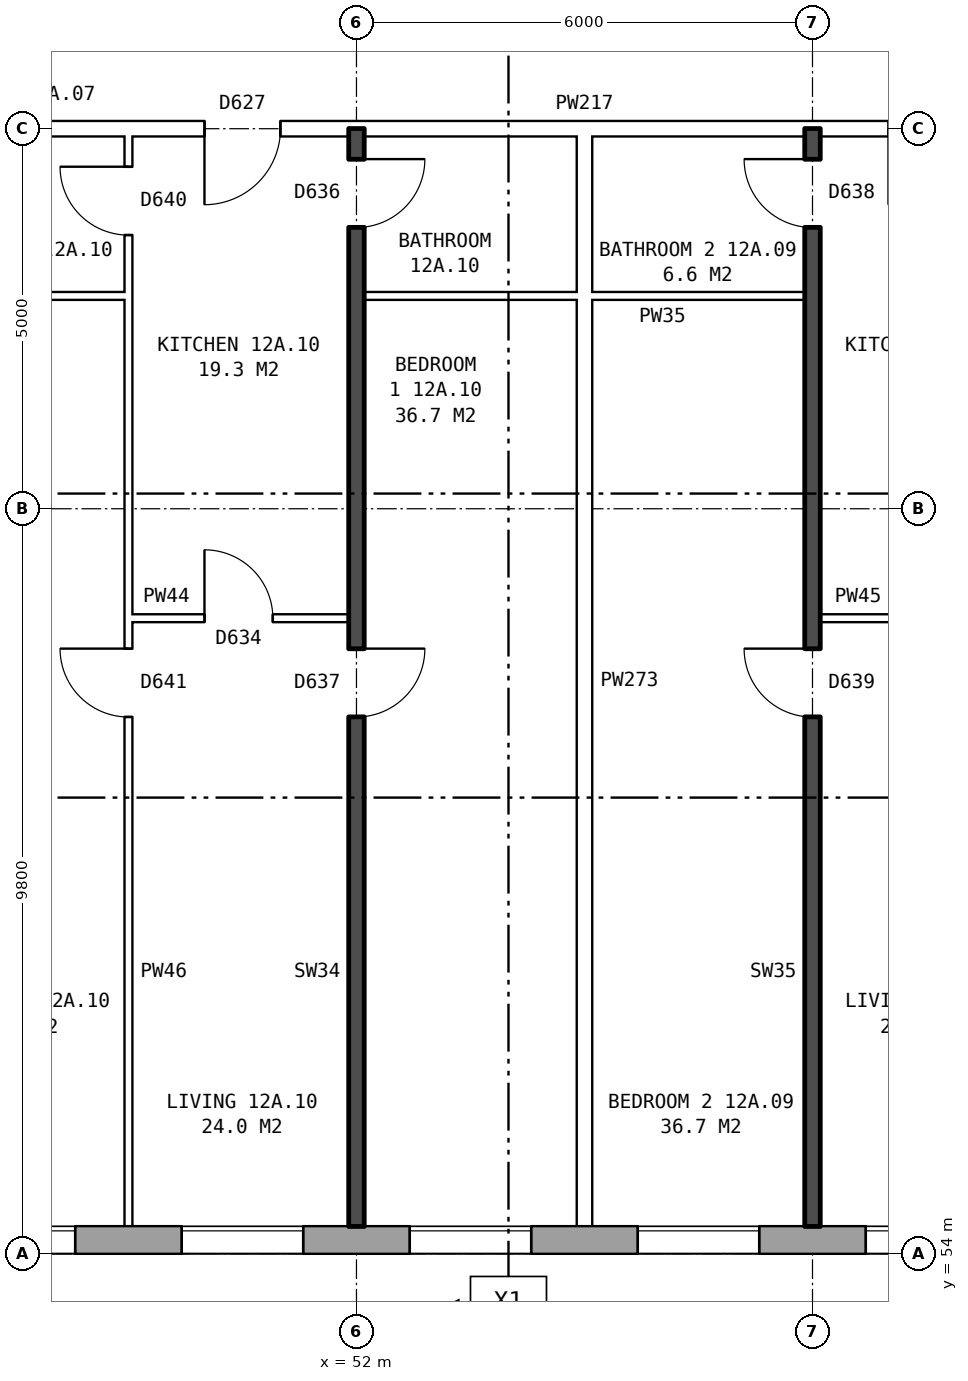
"""IFC4 building model, lengths in metres.
Left out: names, types, materials, properties, quantities, classifications, styles, units other than length and angle.
Written with IfcOpenShell. Run it as: python <this file> out.ifc"""

import sys

from ifc_helpers import new_model, si_unit, direction, frame, frame_2d, origin, place, context, subcontext, project, spatial, rectangle, extrude, element, fill, save


model = new_model("IFC4")
c1 = context("Model", 3, precision=1e-05, world=origin(), true_north=direction((0.0, 1.0)))
c2 = subcontext(c1, "Body", "Model", "MODEL_VIEW")
j1 = project(units=[si_unit("LENGTHUNIT", "METRE"), si_unit("PLANEANGLEUNIT", "RADIAN")], contexts=[c1])
p1 = place(None, origin())
s1 = spatial("IfcSite", under=j1, at=p1, CompositionType="ELEMENT")
p2 = place(p1, origin())
s2 = spatial("IfcBuilding", under=s1, at=p2, CompositionType="ELEMENT")
p3 = place(p2, frame((0.0, 0.0, 47.4)))
s3 = spatial("IfcBuildingStorey", under=s2, at=p3, CompositionType="ELEMENT", Elevation=47.4)
p4 = place(p3, frame((24.575, 54.18, 0.0), z_axis=(0.0, 0.0, 1.0), x_axis=(1.0, 0.0, 0.0)))
e1 = element("IfcWall", 1, at=p4, inside=s3, PredefinedType="STANDARD", context=c2, shape_type="SweptSolid", body=[
    extrude(rectangle(XDim=48.351, YDim=0.36, at=frame_2d((24.175, 0.0))), origin(), (0.0, 0.0, 1.0), 2.85),
])
p5 = place(p4, frame((1.125, 0.0, 0.8)))
e2 = element("IfcOpeningElement", 2, at=p5, cuts=e1, PredefinedType="OPENING", context=c2, shape_type="SweptSolid", body=[
    extrude(rectangle(XDim=1.6, YDim=1.8, at=frame_2d((0.8, 0.9))), frame((0.0, 0.19, 0.0), z_axis=(0.0, -1.0, 0.0), x_axis=(1.0, 0.0, 0.0)), (0.0, 0.0, 1.0), 0.38),
])
p6 = place(p4, frame((5.625, 0.0, 0.8)))
e3 = element("IfcOpeningElement", 3, at=p6, cuts=e1, PredefinedType="OPENING", context=c2, shape_type="SweptSolid", body=[
    extrude(rectangle(XDim=1.2, YDim=1.2, at=frame_2d((0.6, 0.6))), frame((0.0, 0.19, 0.0), z_axis=(0.0, -1.0, 0.0), x_axis=(1.0, 0.0, 0.0)), (0.0, 0.0, 1.0), 0.38),
])
p7 = place(p4, frame((7.125, 0.0, 0.8)))
e4 = element("IfcOpeningElement", 4, at=p7, cuts=e1, PredefinedType="OPENING", context=c2, shape_type="SweptSolid", body=[
    extrude(rectangle(XDim=1.6, YDim=1.8, at=frame_2d((0.8, 0.9))), frame((0.0, 0.19, 0.0), z_axis=(0.0, -1.0, 0.0), x_axis=(1.0, 0.0, 0.0)), (0.0, 0.0, 1.0), 0.38),
])
p8 = place(p4, frame((10.125, 0.0, 0.8)))
e5 = element("IfcOpeningElement", 5, at=p8, cuts=e1, PredefinedType="OPENING", context=c2, shape_type="SweptSolid", body=[
    extrude(rectangle(XDim=1.6, YDim=1.8, at=frame_2d((0.8, 0.9))), frame((0.0, 0.19, 0.0), z_axis=(0.0, -1.0, 0.0), x_axis=(1.0, 0.0, 0.0)), (0.0, 0.0, 1.0), 0.38),
])
p9 = place(p4, frame((13.125, 0.0, 0.8)))
e6 = element("IfcOpeningElement", 6, at=p9, cuts=e1, PredefinedType="OPENING", context=c2, shape_type="SweptSolid", body=[
    extrude(rectangle(XDim=1.6, YDim=1.8, at=frame_2d((0.8, 0.9))), frame((0.0, 0.19, 0.0), z_axis=(0.0, -1.0, 0.0), x_axis=(1.0, 0.0, 0.0)), (0.0, 0.0, 1.0), 0.38),
])
p10 = place(p4, frame((16.125, 0.0, 0.8)))
e7 = element("IfcOpeningElement", 7, at=p10, cuts=e1, PredefinedType="OPENING", context=c2, shape_type="SweptSolid", body=[
    extrude(rectangle(XDim=1.6, YDim=1.8, at=frame_2d((0.8, 0.9))), frame((0.0, 0.19, 0.0), z_axis=(0.0, -1.0, 0.0), x_axis=(1.0, 0.0, 0.0)), (0.0, 0.0, 1.0), 0.38),
])
p11 = place(p4, frame((19.125, 0.0, 0.8)))
e8 = element("IfcOpeningElement", 8, at=p11, cuts=e1, PredefinedType="OPENING", context=c2, shape_type="SweptSolid", body=[
    extrude(rectangle(XDim=1.6, YDim=1.8, at=frame_2d((0.8, 0.9))), frame((0.0, 0.19, 0.0), z_axis=(0.0, -1.0, 0.0), x_axis=(1.0, 0.0, 0.0)), (0.0, 0.0, 1.0), 0.38),
])
p12 = place(p4, frame((22.125, 0.0, 0.8)))
e9 = element("IfcOpeningElement", 9, at=p12, cuts=e1, PredefinedType="OPENING", context=c2, shape_type="SweptSolid", body=[
    extrude(rectangle(XDim=1.6, YDim=1.8, at=frame_2d((0.8, 0.9))), frame((0.0, 0.19, 0.0), z_axis=(0.0, -1.0, 0.0), x_axis=(1.0, 0.0, 0.0)), (0.0, 0.0, 1.0), 0.38),
])
p13 = place(p4, frame((25.125, 0.0, 0.8)))
e10 = element("IfcOpeningElement", 10, at=p13, cuts=e1, PredefinedType="OPENING", context=c2, shape_type="SweptSolid", body=[
    extrude(rectangle(XDim=1.6, YDim=1.8, at=frame_2d((0.8, 0.9))), frame((0.0, 0.19, 0.0), z_axis=(0.0, -1.0, 0.0), x_axis=(1.0, 0.0, 0.0)), (0.0, 0.0, 1.0), 0.38),
])
p14 = place(p4, frame((28.125, 0.0, 0.8)))
e11 = element("IfcOpeningElement", 11, at=p14, cuts=e1, PredefinedType="OPENING", context=c2, shape_type="SweptSolid", body=[
    extrude(rectangle(XDim=1.6, YDim=1.8, at=frame_2d((0.8, 0.9))), frame((0.0, 0.19, 0.0), z_axis=(0.0, -1.0, 0.0), x_axis=(1.0, 0.0, 0.0)), (0.0, 0.0, 1.0), 0.38),
])
p15 = place(p4, frame((31.125, 0.0, 0.8)))
e12 = element("IfcOpeningElement", 12, at=p15, cuts=e1, PredefinedType="OPENING", context=c2, shape_type="SweptSolid", body=[
    extrude(rectangle(XDim=1.6, YDim=1.8, at=frame_2d((0.8, 0.9))), frame((0.0, 0.19, 0.0), z_axis=(0.0, -1.0, 0.0), x_axis=(1.0, 0.0, 0.0)), (0.0, 0.0, 1.0), 0.38),
])
p16 = place(p4, frame((34.125, 0.0, 0.8)))
e13 = element("IfcOpeningElement", 13, at=p16, cuts=e1, PredefinedType="OPENING", context=c2, shape_type="SweptSolid", body=[
    extrude(rectangle(XDim=1.6, YDim=1.8, at=frame_2d((0.8, 0.9))), frame((0.0, 0.19, 0.0), z_axis=(0.0, -1.0, 0.0), x_axis=(1.0, 0.0, 0.0)), (0.0, 0.0, 1.0), 0.38),
])
p17 = place(p4, frame((37.125, 0.0, 0.8)))
e14 = element("IfcOpeningElement", 14, at=p17, cuts=e1, PredefinedType="OPENING", context=c2, shape_type="SweptSolid", body=[
    extrude(rectangle(XDim=1.6, YDim=1.8, at=frame_2d((0.8, 0.9))), frame((0.0, 0.19, 0.0), z_axis=(0.0, -1.0, 0.0), x_axis=(1.0, 0.0, 0.0)), (0.0, 0.0, 1.0), 0.38),
])
p18 = place(p4, frame((40.125, 0.0, 0.8)))
e15 = element("IfcOpeningElement", 15, at=p18, cuts=e1, PredefinedType="OPENING", context=c2, shape_type="SweptSolid", body=[
    extrude(rectangle(XDim=1.6, YDim=1.8, at=frame_2d((0.8, 0.9))), frame((0.0, 0.19, 0.0), z_axis=(0.0, -1.0, 0.0), x_axis=(1.0, 0.0, 0.0)), (0.0, 0.0, 1.0), 0.38),
])
p19 = place(p4, frame((42.025, 0.0, 0.8)))
e16 = element("IfcOpeningElement", 16, at=p19, cuts=e1, PredefinedType="OPENING", context=c2, shape_type="SweptSolid", body=[
    extrude(rectangle(XDim=1.0, YDim=0.9, at=frame_2d((0.5, 0.45))), frame((0.0, 0.19, 0.0), z_axis=(0.0, -1.0, 0.0), x_axis=(1.0, 0.0, 0.0)), (0.0, 0.0, 1.0), 0.38),
])
p20 = place(p4, frame((46.125, 0.0, 0.8)))
e17 = element("IfcOpeningElement", 17, at=p20, cuts=e1, PredefinedType="OPENING", context=c2, shape_type="SweptSolid", body=[
    extrude(rectangle(XDim=1.6, YDim=1.8, at=frame_2d((0.8, 0.9))), frame((0.0, 0.19, 0.0), z_axis=(0.0, -1.0, 0.0), x_axis=(1.0, 0.0, 0.0)), (0.0, 0.0, 1.0), 0.38),
])
p21 = place(p4, frame((44.525, 0.0, 1.7)))
e18 = element("IfcOpeningElement", 18, at=p21, cuts=e1, PredefinedType="OPENING", context=c2, shape_type="SweptSolid", body=[
    extrude(rectangle(XDim=0.6, YDim=0.9, at=frame_2d((0.3, 0.45))), frame((0.0, 0.19, 0.0), z_axis=(0.0, -1.0, 0.0), x_axis=(1.0, 0.0, 0.0)), (0.0, 0.0, 1.0), 0.38),
])
p22 = place(p3, frame((49.0, 62.36, 0.0), z_axis=(0.0, 0.0, 1.0), x_axis=(1.0, 0.0, 0.0)))
e19 = element("IfcWall", 19, at=p22, inside=s3, PredefinedType="PARTITIONING", context=c2, shape_type="SweptSolid", body=[
    extrude(rectangle(XDim=2.9, YDim=0.1, at=frame_2d((1.45, 0.0))), origin(), (0.0, 0.0, 1.0), 2.85),
])
p23 = place(p22, frame((1.0, 0.0, 0.0)))
e20 = element("IfcOpeningElement", 20, at=p23, cuts=e19, PredefinedType="OPENING", context=c2, shape_type="SweptSolid", body=[
    extrude(rectangle(XDim=0.9, YDim=2.1, at=frame_2d((0.45, 1.05))), frame((0.0, 0.06, 0.0), z_axis=(0.0, -1.0, 0.0), x_axis=(1.0, 0.0, 0.0)), (0.0, 0.0, 1.0), 0.12),
])
p24 = place(p3, frame((58.1, 62.36, 0.0), z_axis=(0.0, 0.0, 1.0), x_axis=(1.0, 0.0, 0.0)))
e21 = element("IfcWall", 21, at=p24, inside=s3, PredefinedType="PARTITIONING", context=c2, shape_type="SweptSolid", body=[
    extrude(rectangle(XDim=2.9, YDim=0.1, at=frame_2d((1.45, 0.0))), origin(), (0.0, 0.0, 1.0), 2.85),
])
p25 = place(p24, frame((1.0, 0.0, 0.0)))
e22 = element("IfcOpeningElement", 22, at=p25, cuts=e21, PredefinedType="OPENING", context=c2, shape_type="SweptSolid", body=[
    extrude(rectangle(XDim=0.9, YDim=2.1, at=frame_2d((0.45, 1.05))), frame((0.0, 0.06, 0.0), z_axis=(0.0, -1.0, 0.0), x_axis=(1.0, 0.0, 0.0)), (0.0, 0.0, 1.0), 0.12),
])
p26 = place(p3, frame((46.1, 66.6, 0.0), z_axis=(0.0, 0.0, 1.0), x_axis=(1.0, 0.0, 0.0)))
e23 = element("IfcWall", 23, at=p26, inside=s3, PredefinedType="PARTITIONING", context=c2, shape_type="SweptSolid", body=[
    extrude(rectangle(XDim=2.9, YDim=0.1, at=frame_2d((1.45, 0.0))), origin(), (0.0, 0.0, 1.0), 2.85),
])
p27 = place(p3, frame((52.1, 66.6, 0.0), z_axis=(0.0, 0.0, 1.0), x_axis=(1.0, 0.0, 0.0)))
e24 = element("IfcWall", 24, at=p27, inside=s3, PredefinedType="PARTITIONING", context=c2, shape_type="SweptSolid", body=[
    extrude(rectangle(XDim=5.8, YDim=0.1, at=frame_2d((2.9, 0.0))), origin(), (0.0, 0.0, 1.0), 2.85),
])
p28 = place(p3, frame((44.36, 68.8, 0.0), z_axis=(0.0, 0.0, 1.0), x_axis=(1.0, 0.0, 0.0)))
e25 = element("IfcWall", 25, at=p28, inside=s3, PredefinedType="PARTITIONING", context=c2, shape_type="SweptSolid", body=[
    extrude(rectangle(XDim=19.28, YDim=0.2, at=frame_2d((9.64, 0.0))), origin(), (0.0, 0.0, 1.0), 2.85),
])
p29 = place(p28, frame((14.64, 0.0, 0.0)))
e26 = element("IfcOpeningElement", 26, at=p29, cuts=e25, PredefinedType="OPENING", context=c2, shape_type="SweptSolid", body=[
    extrude(rectangle(XDim=1.0, YDim=2.1, at=frame_2d((0.5, 1.05))), frame((0.0, 0.11, 0.0), z_axis=(0.0, -1.0, 0.0), x_axis=(1.0, 0.0, 0.0)), (0.0, 0.0, 1.0), 0.22),
])
p30 = place(p28, frame((5.64, 0.0, 0.0)))
e27 = element("IfcOpeningElement", 27, at=p30, cuts=e25, PredefinedType="OPENING", context=c2, shape_type="SweptSolid", body=[
    extrude(rectangle(XDim=1.0, YDim=2.1, at=frame_2d((0.5, 1.05))), frame((0.0, 0.11, 0.0), z_axis=(0.0, -1.0, 0.0), x_axis=(1.0, 0.0, 0.0)), (0.0, 0.0, 1.0), 0.22),
])
p31 = place(p3, frame((49.0, 54.36, 0.0), z_axis=(0.0, 0.0, 1.0), x_axis=(0.0, 1.0, 0.0)))
e28 = element("IfcWall", 28, at=p31, inside=s3, PredefinedType="PARTITIONING", context=c2, shape_type="SweptSolid", body=[
    extrude(rectangle(XDim=14.34, YDim=0.1, at=frame_2d((7.17, 0.0))), origin(), (0.0, 0.0, 1.0), 2.85),
])
p32 = place(p31, frame((6.7, 0.0, 0.0)))
e29 = element("IfcOpeningElement", 29, at=p32, cuts=e28, PredefinedType="OPENING", context=c2, shape_type="SweptSolid", body=[
    extrude(rectangle(XDim=0.9, YDim=2.1, at=frame_2d((0.45, 1.05))), frame((0.0, 0.06, 0.0), z_axis=(0.0, -1.0, 0.0), x_axis=(1.0, 0.0, 0.0)), (0.0, 0.0, 1.0), 0.12),
])
p33 = place(p31, frame((13.04, 0.0, 0.0)))
e30 = element("IfcOpeningElement", 30, at=p33, cuts=e28, PredefinedType="OPENING", context=c2, shape_type="SweptSolid", body=[
    extrude(rectangle(XDim=0.9, YDim=2.1, at=frame_2d((0.45, 1.05))), frame((0.0, 0.06, 0.0), z_axis=(0.0, -1.0, 0.0), x_axis=(1.0, 0.0, 0.0)), (0.0, 0.0, 1.0), 0.12),
])
p34 = place(p3, frame((52.0, 54.36, 0.0), z_axis=(0.0, 0.0, 1.0), x_axis=(0.0, 1.0, 0.0)))
e31 = element("IfcWall", 31, at=p34, inside=s3, PredefinedType="SOLIDWALL", context=c2, shape_type="SweptSolid", body=[
    extrude(rectangle(XDim=14.44, YDim=0.2, at=frame_2d((7.22, 0.0))), origin(), (0.0, 0.0, 1.0), 2.85),
])
p35 = place(p34, frame((6.7, 0.0, 0.0)))
e32 = element("IfcOpeningElement", 32, at=p35, cuts=e31, PredefinedType="OPENING", context=c2, shape_type="SweptSolid", body=[
    extrude(rectangle(XDim=0.9, YDim=2.1, at=frame_2d((0.45, 1.05))), frame((0.0, 0.11, 0.0), z_axis=(0.0, -1.0, 0.0), x_axis=(1.0, 0.0, 0.0)), (0.0, 0.0, 1.0), 0.22),
])
p36 = place(p34, frame((13.14, 0.0, 0.0)))
e33 = element("IfcOpeningElement", 33, at=p36, cuts=e31, PredefinedType="OPENING", context=c2, shape_type="SweptSolid", body=[
    extrude(rectangle(XDim=0.9, YDim=2.1, at=frame_2d((0.45, 1.05))), frame((0.0, 0.11, 0.0), z_axis=(0.0, -1.0, 0.0), x_axis=(1.0, 0.0, 0.0)), (0.0, 0.0, 1.0), 0.22),
])
p37 = place(p3, frame((55.0, 54.36, 0.0), z_axis=(0.0, 0.0, 1.0), x_axis=(0.0, 1.0, 0.0)))
e34 = element("IfcWall", 34, at=p37, inside=s3, PredefinedType="PARTITIONING", context=c2, shape_type="SweptSolid", body=[
    extrude(rectangle(XDim=14.34, YDim=0.2, at=frame_2d((7.17, 0.0))), origin(), (0.0, 0.0, 1.0), 2.85),
])
p38 = place(p3, frame((58.0, 54.36, 0.0), z_axis=(0.0, 0.0, 1.0), x_axis=(0.0, 1.0, 0.0)))
e35 = element("IfcWall", 35, at=p38, inside=s3, PredefinedType="SOLIDWALL", context=c2, shape_type="SweptSolid", body=[
    extrude(rectangle(XDim=14.44, YDim=0.2, at=frame_2d((7.22, 0.0))), origin(), (0.0, 0.0, 1.0), 2.85),
])
p39 = place(p38, frame((6.7, 0.0, 0.0)))
e36 = element("IfcOpeningElement", 36, at=p39, cuts=e35, PredefinedType="OPENING", context=c2, shape_type="SweptSolid", body=[
    extrude(rectangle(XDim=0.9, YDim=2.1, at=frame_2d((0.45, 1.05))), frame((0.0, 0.11, 0.0), z_axis=(0.0, -1.0, 0.0), x_axis=(1.0, 0.0, 0.0)), (0.0, 0.0, 1.0), 0.22),
])
p40 = place(p38, frame((13.14, 0.0, 0.0)))
e37 = element("IfcOpeningElement", 37, at=p40, cuts=e35, PredefinedType="OPENING", context=c2, shape_type="SweptSolid", body=[
    extrude(rectangle(XDim=0.9, YDim=2.1, at=frame_2d((0.45, 1.05))), frame((0.0, 0.11, 0.0), z_axis=(0.0, -1.0, 0.0), x_axis=(1.0, 0.0, 0.0)), (0.0, 0.0, 1.0), 0.22),
])
p41 = place(p12, origin())
e38 = element("IfcWindow", 38, at=p41, inside=s3, PartitioningType="SINGLE_PANEL", PredefinedType="WINDOW", context=c2, shape_type="SweptSolid", body=[
    extrude(rectangle(XDim=1.6, YDim=1.8, at=frame_2d((0.8, 0.9))), frame((0.0, 0.15, 0.0), z_axis=(0.0, -1.0, 0.0), x_axis=(1.0, 0.0, 0.0)), (0.0, 0.0, 1.0), 0.06),
])
fill(e9, e38)
p42 = place(p13, origin())
e39 = element("IfcWindow", 39, at=p42, inside=s3, PartitioningType="SINGLE_PANEL", PredefinedType="WINDOW", context=c2, shape_type="SweptSolid", body=[
    extrude(rectangle(XDim=1.6, YDim=1.8, at=frame_2d((0.8, 0.9))), frame((0.0, 0.15, 0.0), z_axis=(0.0, -1.0, 0.0), x_axis=(1.0, 0.0, 0.0)), (0.0, 0.0, 1.0), 0.06),
])
fill(e10, e39)
p43 = place(p14, origin())
e40 = element("IfcWindow", 40, at=p43, inside=s3, PartitioningType="SINGLE_PANEL", PredefinedType="WINDOW", context=c2, shape_type="SweptSolid", body=[
    extrude(rectangle(XDim=1.6, YDim=1.8, at=frame_2d((0.8, 0.9))), frame((0.0, 0.15, 0.0), z_axis=(0.0, -1.0, 0.0), x_axis=(1.0, 0.0, 0.0)), (0.0, 0.0, 1.0), 0.06),
])
fill(e11, e40)
p44 = place(p15, origin())
e41 = element("IfcWindow", 41, at=p44, inside=s3, PartitioningType="SINGLE_PANEL", PredefinedType="WINDOW", context=c2, shape_type="SweptSolid", body=[
    extrude(rectangle(XDim=1.6, YDim=1.8, at=frame_2d((0.8, 0.9))), frame((0.0, 0.15, 0.0), z_axis=(0.0, -1.0, 0.0), x_axis=(1.0, 0.0, 0.0)), (0.0, 0.0, 1.0), 0.06),
])
fill(e12, e41)
p45 = place(p16, origin())
e42 = element("IfcWindow", 42, at=p45, inside=s3, PartitioningType="SINGLE_PANEL", PredefinedType="WINDOW", context=c2, shape_type="SweptSolid", body=[
    extrude(rectangle(XDim=1.6, YDim=1.8, at=frame_2d((0.8, 0.9))), frame((0.0, 0.15, 0.0), z_axis=(0.0, -1.0, 0.0), x_axis=(1.0, 0.0, 0.0)), (0.0, 0.0, 1.0), 0.06),
])
fill(e13, e42)
p46 = place(p39, origin())
e43 = element("IfcDoor", 43, at=p46, inside=s3, OperationType="SINGLE_SWING_RIGHT", PredefinedType="DOOR", context=c2, shape_type="SweptSolid", body=[
    extrude(rectangle(XDim=0.9, YDim=2.1, at=frame_2d((0.45, 1.05))), frame((0.0, 0.025, 0.0), z_axis=(0.0, -1.0, 0.0), x_axis=(1.0, 0.0, 0.0)), (0.0, 0.0, 1.0), 0.05),
])
fill(e36, e43)
p47 = place(p40, origin())
e44 = element("IfcDoor", 44, at=p47, inside=s3, OperationType="SINGLE_SWING_RIGHT", PredefinedType="DOOR", context=c2, shape_type="SweptSolid", body=[
    extrude(rectangle(XDim=0.9, YDim=2.1, at=frame_2d((0.45, 1.05))), frame((0.0, 0.025, 0.0), z_axis=(0.0, -1.0, 0.0), x_axis=(1.0, 0.0, 0.0)), (0.0, 0.0, 1.0), 0.05),
])
fill(e37, e44)
p48 = place(p35, frame((0.9, 0.0, 0.0), z_axis=(0.0, 0.0, 1.0), x_axis=(-1.0, 0.0, 0.0)))
e45 = element("IfcDoor", 45, at=p48, inside=s3, OperationType="SINGLE_SWING_LEFT", PredefinedType="DOOR", context=c2, shape_type="SweptSolid", body=[
    extrude(rectangle(XDim=0.9, YDim=2.1, at=frame_2d((0.45, 1.05))), frame((0.0, 0.025, 0.0), z_axis=(0.0, -1.0, 0.0), x_axis=(1.0, 0.0, 0.0)), (0.0, 0.0, 1.0), 0.05),
])
fill(e32, e45)
p49 = place(p32, origin())
e46 = element("IfcDoor", 46, at=p49, inside=s3, OperationType="SINGLE_SWING_RIGHT", PredefinedType="DOOR", context=c2, shape_type="SweptSolid", body=[
    extrude(rectangle(XDim=0.9, YDim=2.1, at=frame_2d((0.45, 1.05))), frame((0.0, 0.025, 0.0), z_axis=(0.0, -1.0, 0.0), x_axis=(1.0, 0.0, 0.0)), (0.0, 0.0, 1.0), 0.05),
])
fill(e29, e46)
p50 = place(p30, frame((1.0, 0.0, 0.0), z_axis=(0.0, 0.0, 1.0), x_axis=(-1.0, 0.0, 0.0)))
e47 = element("IfcDoor", 47, at=p50, inside=s3, OperationType="SINGLE_SWING_RIGHT", PredefinedType="DOOR", context=c2, shape_type="SweptSolid", body=[
    extrude(rectangle(XDim=1.0, YDim=2.1, at=frame_2d((0.5, 1.05))), frame((0.0, 0.025, 0.0), z_axis=(0.0, -1.0, 0.0), x_axis=(1.0, 0.0, 0.0)), (0.0, 0.0, 1.0), 0.05),
])
fill(e27, e47)
p51 = place(p23, origin())
e48 = element("IfcDoor", 48, at=p51, inside=s3, OperationType="SINGLE_SWING_LEFT", PredefinedType="DOOR", context=c2, shape_type="SweptSolid", body=[
    extrude(rectangle(XDim=0.9, YDim=2.1, at=frame_2d((0.45, 1.05))), frame((0.0, 0.025, 0.0), z_axis=(0.0, -1.0, 0.0), x_axis=(1.0, 0.0, 0.0)), (0.0, 0.0, 1.0), 0.05),
])
fill(e20, e48)
p52 = place(p36, frame((0.9, 0.0, 0.0), z_axis=(0.0, 0.0, 1.0), x_axis=(-1.0, 0.0, 0.0)))
e49 = element("IfcDoor", 49, at=p52, inside=s3, OperationType="SINGLE_SWING_LEFT", PredefinedType="DOOR", context=c2, shape_type="SweptSolid", body=[
    extrude(rectangle(XDim=0.9, YDim=2.1, at=frame_2d((0.45, 1.05))), frame((0.0, 0.025, 0.0), z_axis=(0.0, -1.0, 0.0), x_axis=(1.0, 0.0, 0.0)), (0.0, 0.0, 1.0), 0.05),
])
fill(e33, e49)
p53 = place(p33, origin())
e50 = element("IfcDoor", 50, at=p53, inside=s3, OperationType="SINGLE_SWING_RIGHT", PredefinedType="DOOR", context=c2, shape_type="SweptSolid", body=[
    extrude(rectangle(XDim=0.9, YDim=2.1, at=frame_2d((0.45, 1.05))), frame((0.0, 0.025, 0.0), z_axis=(0.0, -1.0, 0.0), x_axis=(1.0, 0.0, 0.0)), (0.0, 0.0, 1.0), 0.05),
])
fill(e30, e50)
save(model, sys.argv[1])
